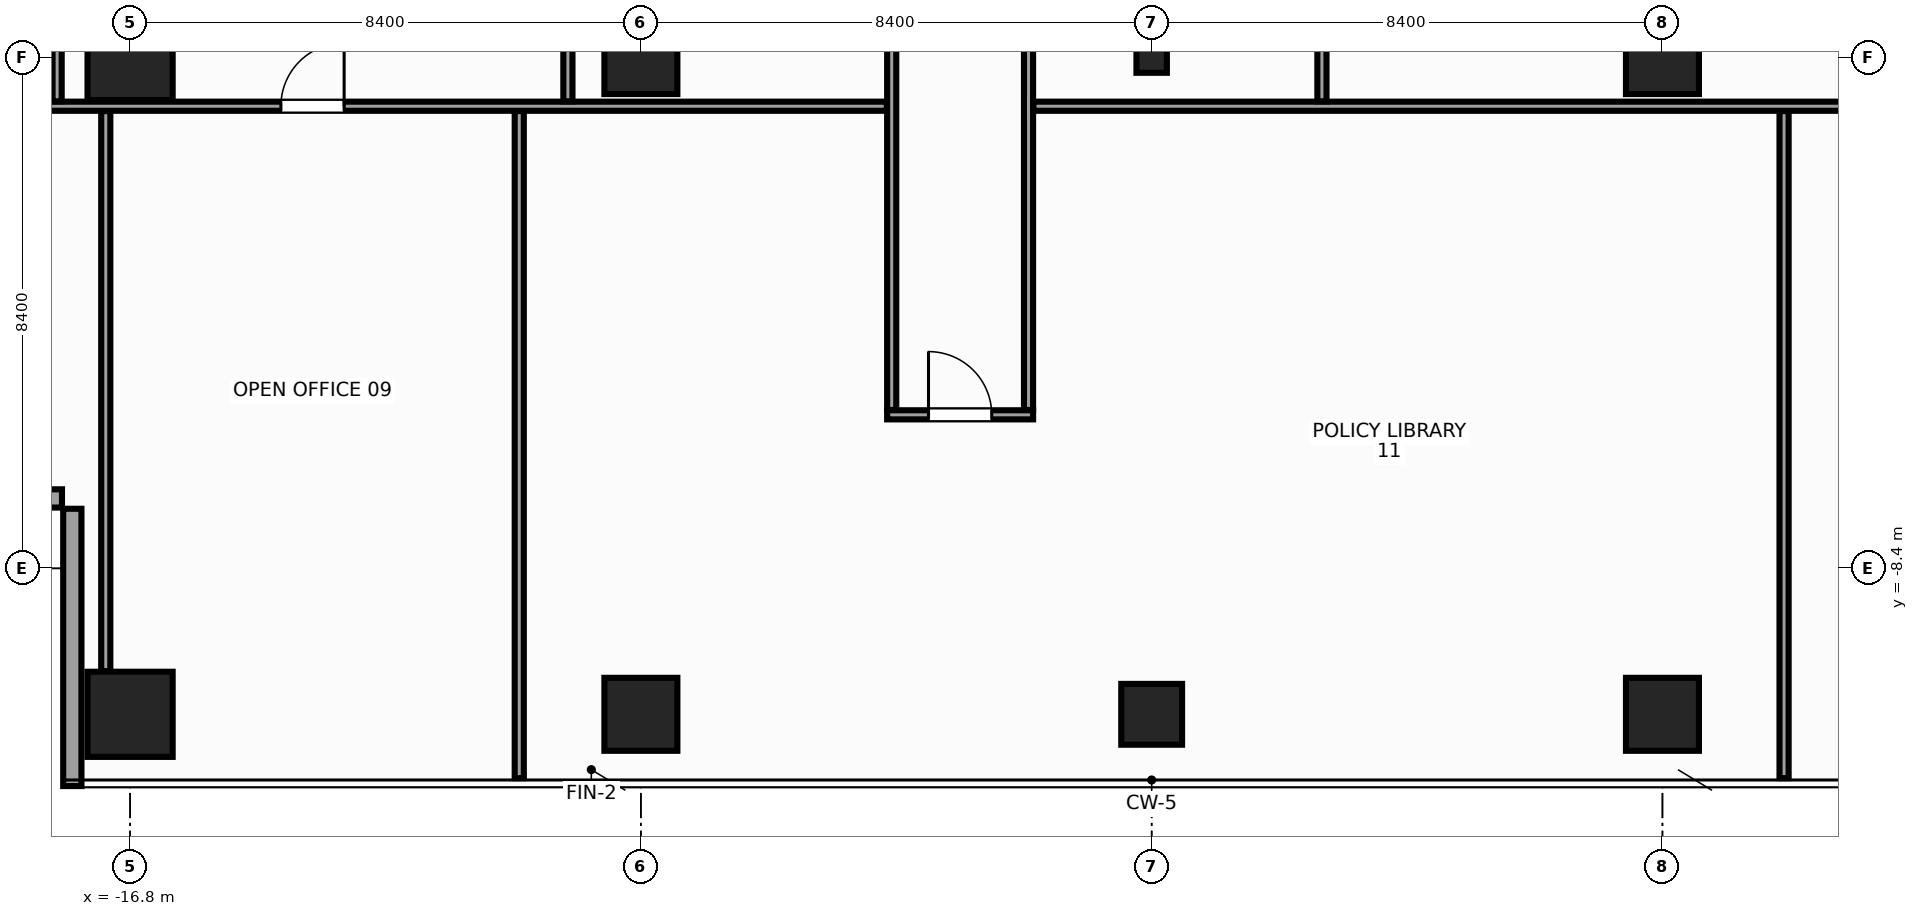
"""IFC4 building model, lengths in metres.
Left out: names, types, materials, properties, quantities, classifications, styles, units other than length and angle.
Written with IfcOpenShell. Run it as: python <this file> out.ifc"""

import sys

from ifc_helpers import new_model, si_unit, direction, frame, frame_2d, origin, origin_with_axes, origin_2d, place, context, subcontext, project, spatial, rectangle, hollow_rectangle, extrude, source, transform, mapped, element, fill, save


model = new_model("IFC4")
c1 = context("Model", 3, precision=1e-05, world=origin(), true_north=direction((0.0, 1.0)))
c2 = subcontext(c1, "Body", "Model", "MODEL_VIEW")
j1 = project(units=[si_unit("LENGTHUNIT", "METRE"), si_unit("PLANEANGLEUNIT", "RADIAN")], contexts=[c1])
p1 = place(None, origin())
s1 = spatial("IfcSite", under=j1, at=p1, CompositionType="ELEMENT")
p2 = place(p1, origin())
s2 = spatial("IfcBuilding", under=s1, at=p2, CompositionType="ELEMENT")
p3 = place(p2, frame((0.0, 0.0, 250.4)))
s3 = spatial("IfcBuildingStorey", under=s2, at=p3, CompositionType="ELEMENT", Elevation=250.4)
m1 = source(origin(), c2, "Body", "SweptSolid", [
    extrude(rectangle(XDim=1.4, YDim=1.4, at=origin_2d()), origin(), (0.0, 0.0, 1.0), 3.6),
])
for number, where, z_axis, x_axis in (
    (1, (-16.8, -10.8, 0.0), (0.0, 0.0, 1.0), (1.0, 0.0, 0.0)),
    (2, (-16.8, 0.0, 0.0), (0.0, 0.0, 1.0), (1.0, 0.0, 0.0)),
):
    element("IfcColumn", number, at=place(p3, frame(where, z_axis=z_axis, x_axis=x_axis)), inside=s3, PredefinedType="COLUMN", context=c2, shape_type="MappedRepresentation", body=[
        mapped(m1, transform((0.0, 0.0, 0.0), x_axis=(1.0, 0.0, 0.0), y_axis=(0.0, 1.0, 0.0), z_axis=(0.0, 0.0, 1.0), scale=1.0)),
    ])
m2 = source(origin(), c2, "Body", "SweptSolid", [
    extrude(rectangle(XDim=1.2, YDim=1.2, at=origin_2d()), origin(), (0.0, 0.0, 1.0), 3.6),
])
for number, where, z_axis, x_axis in (
    (3, (-8.4, 0.0, 0.0), (0.0, 0.0, 1.0), (1.0, 0.0, 0.0)),
    (4, (-8.4, -10.8, 0.0), (0.0, 0.0, 1.0), (1.0, 0.0, 0.0)),
    (5, (8.4, 0.0, 0.0), (0.0, 0.0, 1.0), (1.0, 0.0, 0.0)),
    (6, (8.4, -10.8, 0.0), (0.0, 0.0, 1.0), (1.0, 0.0, 0.0)),
):
    element("IfcColumn", number, at=place(p3, frame(where, z_axis=z_axis, x_axis=x_axis)), inside=s3, PredefinedType="COLUMN", context=c2, shape_type="MappedRepresentation", body=[
        mapped(m2, transform((0.0, 0.0, 0.0), x_axis=(1.0, 0.0, 0.0), y_axis=(0.0, 1.0, 0.0), z_axis=(0.0, 0.0, 1.0), scale=1.0)),
    ])
m3 = source(origin(), c2, "Body", "SweptSolid", [
    extrude(rectangle(XDim=1.0, YDim=1.0, at=origin_2d()), origin(), (0.0, 0.0, 1.0), 3.6),
])
p4 = place(p3, frame((0.0, -10.8, 0.0), z_axis=(0.0, 0.0, 1.0), x_axis=(1.0, 0.0, 0.0)))
e7 = element("IfcColumn", 7, at=p4, inside=s3, PredefinedType="COLUMN", context=c2, shape_type="MappedRepresentation", body=[
    mapped(m3, transform((0.0, 0.0, 0.0), x_axis=(1.0, 0.0, 0.0), y_axis=(0.0, 1.0, 0.0), z_axis=(0.0, 0.0, 1.0), scale=1.0)),
])
m4 = source(origin(), c2, "Body", "SweptSolid", [
    extrude(hollow_rectangle(XDim=0.5, YDim=0.5, WallThickness=0.025, at=origin_2d()), origin(), (0.0, 0.0, 1.0), 3.6),
])
p5 = place(p3, origin_with_axes())
e8 = element("IfcColumn", 8, at=p5, inside=s3, PredefinedType="COLUMN", context=c2, shape_type="MappedRepresentation", body=[
    mapped(m4, transform((0.0, 0.0, 0.0), x_axis=(1.0, 0.0, 0.0), y_axis=(0.0, 1.0, 0.0), z_axis=(0.0, 0.0, 1.0), scale=1.0)),
])
m5 = source(origin(), c2, "Body", "SweptSolid", [
    extrude(rectangle(XDim=4.56, YDim=0.3, at=frame_2d((2.28, 0.0))), origin(), (0.0, 0.0, 1.0), 2.75),
])
for number, where, z_axis, x_axis in (
    (9, (-22.48, -7.25, 0.0), (0.0, 0.0, 1.0), (1.0, 0.0, 0.0)),
    (10, (-17.75, -7.42, 0.0), (0.0, 0.0, 1.0), (0.0, -1.0, 0.0)),
):
    element("IfcWall", number, at=place(p3, frame(where, z_axis=z_axis, x_axis=x_axis)), inside=s3, PredefinedType="STANDARD", context=c2, shape_type="MappedRepresentation", body=[
        mapped(m5, transform((0.0, 0.0, 0.0), x_axis=(1.0, 0.0, 0.0), y_axis=(0.0, 1.0, 0.0), z_axis=(0.0, 0.0, 1.0), scale=1.0)),
    ])
m6 = source(origin(), c2, "Body", "SweptSolid", [
    extrude(rectangle(XDim=2.4, YDim=0.15, at=frame_2d((1.2, 0.0))), origin(), (0.0, 0.0, 1.0), 3.37),
])
p6 = place(p3, frame((-4.35, -5.875, 0.0), z_axis=(0.0, 0.0, 1.0), x_axis=(1.0, 0.0, 0.0)))
e11 = element("IfcWall", 11, at=p6, inside=s3, PredefinedType="PARTITIONING", context=c2, shape_type="MappedRepresentation", body=[
    mapped(m6, transform((0.0, 0.0, 0.0), x_axis=(1.0, 0.0, 0.0), y_axis=(0.0, 1.0, 0.0), z_axis=(0.0, 0.0, 1.0), scale=1.0)),
])
p7 = place(p6, frame((0.68, 0.0, 0.0)))
e12 = element("IfcOpeningElement", 12, at=p7, cuts=e11, PredefinedType="OPENING", context=c2, shape_type="SweptSolid", body=[
    extrude(rectangle(XDim=1.04, YDim=2.2, at=frame_2d((0.52, 1.1))), frame((0.0, 0.087, 0.0), z_axis=(0.0, -1.0, 0.0), x_axis=(1.0, 0.0, 0.0)), (0.0, 0.0, 1.0), 0.174),
])
m7 = source(origin(), c2, "Body", "SweptSolid", [
    extrude(rectangle(XDim=13.595, YDim=0.15, at=frame_2d((6.797, 0.0))), origin(), (0.0, 0.0, 1.0), 2.655),
])
for number, where, z_axis, x_axis in (
    (13, (-4.275, -5.795, 0.0), (0.0, 0.0, 1.0), (0.0, 1.0, 0.0)),
    (14, (-2.025, -5.795, 0.0), (0.0, 0.0, 1.0), (0.0, 1.0, 0.0)),
):
    element("IfcWall", number, at=place(p3, frame(where, z_axis=z_axis, x_axis=x_axis)), inside=s3, PredefinedType="PARTITIONING", context=c2, shape_type="MappedRepresentation", body=[
        mapped(m7, transform((0.0, 0.0, 0.0), x_axis=(1.0, 0.0, 0.0), y_axis=(0.0, 1.0, 0.0), z_axis=(0.0, 0.0, 1.0), scale=1.0)),
    ])
m8 = source(origin(), c2, "Body", "SweptSolid", [
    extrude(rectangle(XDim=17.995, YDim=0.15, at=frame_2d((8.998, 0.0))), origin(), (0.0, 0.0, 1.0), 2.755),
])
p8 = place(p3, frame((-22.35, -0.8, 0.0), z_axis=(0.0, 0.0, 1.0), x_axis=(1.0, 0.0, 0.0)))
e15 = element("IfcWall", 15, at=p8, inside=s3, PredefinedType="PARTITIONING", context=c2, shape_type="MappedRepresentation", body=[
    mapped(m8, transform((0.0, 0.0, 0.0), x_axis=(1.0, 0.0, 0.0), y_axis=(0.0, 1.0, 0.0), z_axis=(0.0, 0.0, 1.0), scale=1.0)),
])
p9 = place(p8, frame((1.018, 0.0, 0.0)))
e16 = element("IfcOpeningElement", 16, at=p9, cuts=e15, PredefinedType="OPENING", context=c2, shape_type="SweptSolid", body=[
    extrude(rectangle(XDim=1.04, YDim=2.2, at=frame_2d((0.52, 1.1))), frame((0.0, 0.087, 0.0), z_axis=(0.0, -1.0, 0.0), x_axis=(1.0, 0.0, 0.0)), (0.0, 0.0, 1.0), 0.174),
])
p10 = place(p8, frame((8.03, 0.0, 0.0)))
e17 = element("IfcOpeningElement", 17, at=p10, cuts=e15, PredefinedType="OPENING", context=c2, shape_type="SweptSolid", body=[
    extrude(rectangle(XDim=1.04, YDim=2.2, at=frame_2d((0.52, 1.1))), frame((0.0, 0.087, 0.0), z_axis=(0.0, -1.0, 0.0), x_axis=(1.0, 0.0, 0.0)), (0.0, 0.0, 1.0), 0.174),
])
m9 = source(origin(), c2, "Body", "SweptSolid", [
    extrude(rectangle(XDim=24.295, YDim=0.15, at=frame_2d((12.147, 0.0))), origin(), (0.0, 0.0, 1.0), 2.755),
])
p11 = place(p3, frame((-1.945, -0.8, 0.0), z_axis=(0.0, 0.0, 1.0), x_axis=(1.0, 0.0, 0.0)))
e18 = element("IfcWall", 18, at=p11, inside=s3, PredefinedType="PARTITIONING", context=c2, shape_type="MappedRepresentation", body=[
    mapped(m9, transform((0.0, 0.0, 0.0), x_axis=(1.0, 0.0, 0.0), y_axis=(0.0, 1.0, 0.0), z_axis=(0.0, 0.0, 1.0), scale=1.0)),
])
p12 = place(p11, frame((22.278, 0.0, 0.0)))
e19 = element("IfcOpeningElement", 19, at=p12, cuts=e18, PredefinedType="OPENING", context=c2, shape_type="SweptSolid", body=[
    extrude(rectangle(XDim=1.04, YDim=2.2, at=frame_2d((0.52, 1.1))), frame((0.0, 0.087, 0.0), z_axis=(0.0, -1.0, 0.0), x_axis=(1.0, 0.0, 0.0)), (0.0, 0.0, 1.0), 0.174),
])
p13 = place(p11, frame((15.945, 0.0, 0.0)))
e20 = element("IfcOpeningElement", 20, at=p13, cuts=e18, PredefinedType="OPENING", context=c2, shape_type="SweptSolid", body=[
    extrude(rectangle(XDim=1.04, YDim=2.2, at=frame_2d((0.52, 1.1))), frame((0.0, 0.087, 0.0), z_axis=(0.0, -1.0, 0.0), x_axis=(1.0, 0.0, 0.0)), (0.0, 0.0, 1.0), 0.174),
])
m10 = source(origin(), c2, "Body", "SweptSolid", [
    extrude(rectangle(XDim=8.365, YDim=0.15, at=frame_2d((4.183, 0.0))), origin(), (0.0, 0.0, 1.0), 3.37),
])
p14 = place(p3, frame((-18.0, -0.72, 0.0), z_axis=(0.0, 0.0, 1.0), x_axis=(0.0, 1.0, 0.0)))
e21 = element("IfcWall", 21, at=p14, inside=s3, PredefinedType="PARTITIONING", context=c2, shape_type="MappedRepresentation", body=[
    mapped(m10, transform((0.0, 0.0, 0.0), x_axis=(1.0, 0.0, 0.0), y_axis=(0.0, 1.0, 0.0), z_axis=(0.0, 0.0, 1.0), scale=1.0)),
])
m11 = source(origin(), c2, "Body", "SweptSolid", [
    extrude(rectangle(XDim=8.365, YDim=0.15, at=frame_2d((4.183, 0.0))), origin(), (0.0, 0.0, 1.0), 2.655),
])
for number, where, z_axis, x_axis in (
    (22, (-9.6, -0.72, 0.0), (0.0, 0.0, 1.0), (0.0, 1.0, 0.0)),
    (23, (2.8, -0.72, 0.0), (0.0, 0.0, 1.0), (0.0, 1.0, 0.0)),
):
    element("IfcWall", number, at=place(p3, frame(where, z_axis=z_axis, x_axis=x_axis)), inside=s3, PredefinedType="PARTITIONING", context=c2, shape_type="MappedRepresentation", body=[
        mapped(m11, transform((0.0, 0.0, 0.0), x_axis=(1.0, 0.0, 0.0), y_axis=(0.0, 1.0, 0.0), z_axis=(0.0, 0.0, 1.0), scale=1.0)),
    ])
m12 = source(origin(), c2, "Body", "SweptSolid", [
    extrude(rectangle(XDim=9.21, YDim=0.15, at=frame_2d((4.605, 0.0))), origin(), (0.0, 0.0, 1.0), 3.37),
])
p15 = place(p3, frame((-17.2, -10.09, 0.0), z_axis=(0.0, 0.0, 1.0), x_axis=(0.0, 1.0, 0.0)))
e24 = element("IfcWall", 24, at=p15, inside=s3, PredefinedType="PARTITIONING", context=c2, shape_type="MappedRepresentation", body=[
    mapped(m12, transform((0.0, 0.0, 0.0), x_axis=(1.0, 0.0, 0.0), y_axis=(0.0, 1.0, 0.0), z_axis=(0.0, 0.0, 1.0), scale=1.0)),
])
m13 = source(origin(), c2, "Body", "SweptSolid", [
    extrude(rectangle(XDim=10.97, YDim=0.15, at=frame_2d((5.485, 0.0))), origin(), (0.0, 0.0, 1.0), 2.905),
])
for number, where, z_axis, x_axis in (
    (25, (-10.4, -11.85, 0.0), (0.0, 0.0, 1.0), (0.0, 1.0, 0.0)),
    (26, (10.4, -11.85, 0.0), (0.0, 0.0, 1.0), (0.0, 1.0, 0.0)),
):
    element("IfcWall", number, at=place(p3, frame(where, z_axis=z_axis, x_axis=x_axis)), inside=s3, PredefinedType="PARTITIONING", context=c2, shape_type="MappedRepresentation", body=[
        mapped(m13, transform((0.0, 0.0, 0.0), x_axis=(1.0, 0.0, 0.0), y_axis=(0.0, 1.0, 0.0), z_axis=(0.0, 0.0, 1.0), scale=1.0)),
    ])
m14 = source(origin(), c2, "Body", "SweptSolid", [
    extrude(rectangle(XDim=1.04, YDim=2.2, at=frame_2d((0.52, 1.1))), frame((0.0, 0.025, 0.0), z_axis=(0.0, -1.0, 0.0), x_axis=(1.0, 0.0, 0.0)), (0.0, 0.0, 1.0), 0.05),
])
p16 = place(p7, origin())
e27 = element("IfcDoor", 27, at=p16, inside=s3, OperationType="SINGLE_SWING_LEFT", PredefinedType="DOOR", context=c2, shape_type="MappedRepresentation", body=[
    mapped(m14, transform((0.0, 0.0, 0.0), x_axis=(1.0, 0.0, 0.0), y_axis=(0.0, 1.0, 0.0), z_axis=(0.0, 0.0, 1.0), scale=1.0)),
])
fill(e12, e27)
p17 = place(p10, origin())
e28 = element("IfcDoor", 28, at=p17, inside=s3, OperationType="SINGLE_SWING_RIGHT", PredefinedType="DOOR", context=c2, shape_type="MappedRepresentation", body=[
    mapped(m14, transform((0.0, 0.0, 0.0), x_axis=(1.0, 0.0, 0.0), y_axis=(0.0, 1.0, 0.0), z_axis=(0.0, 0.0, 1.0), scale=1.0)),
])
fill(e17, e28)
save(model, sys.argv[1])
